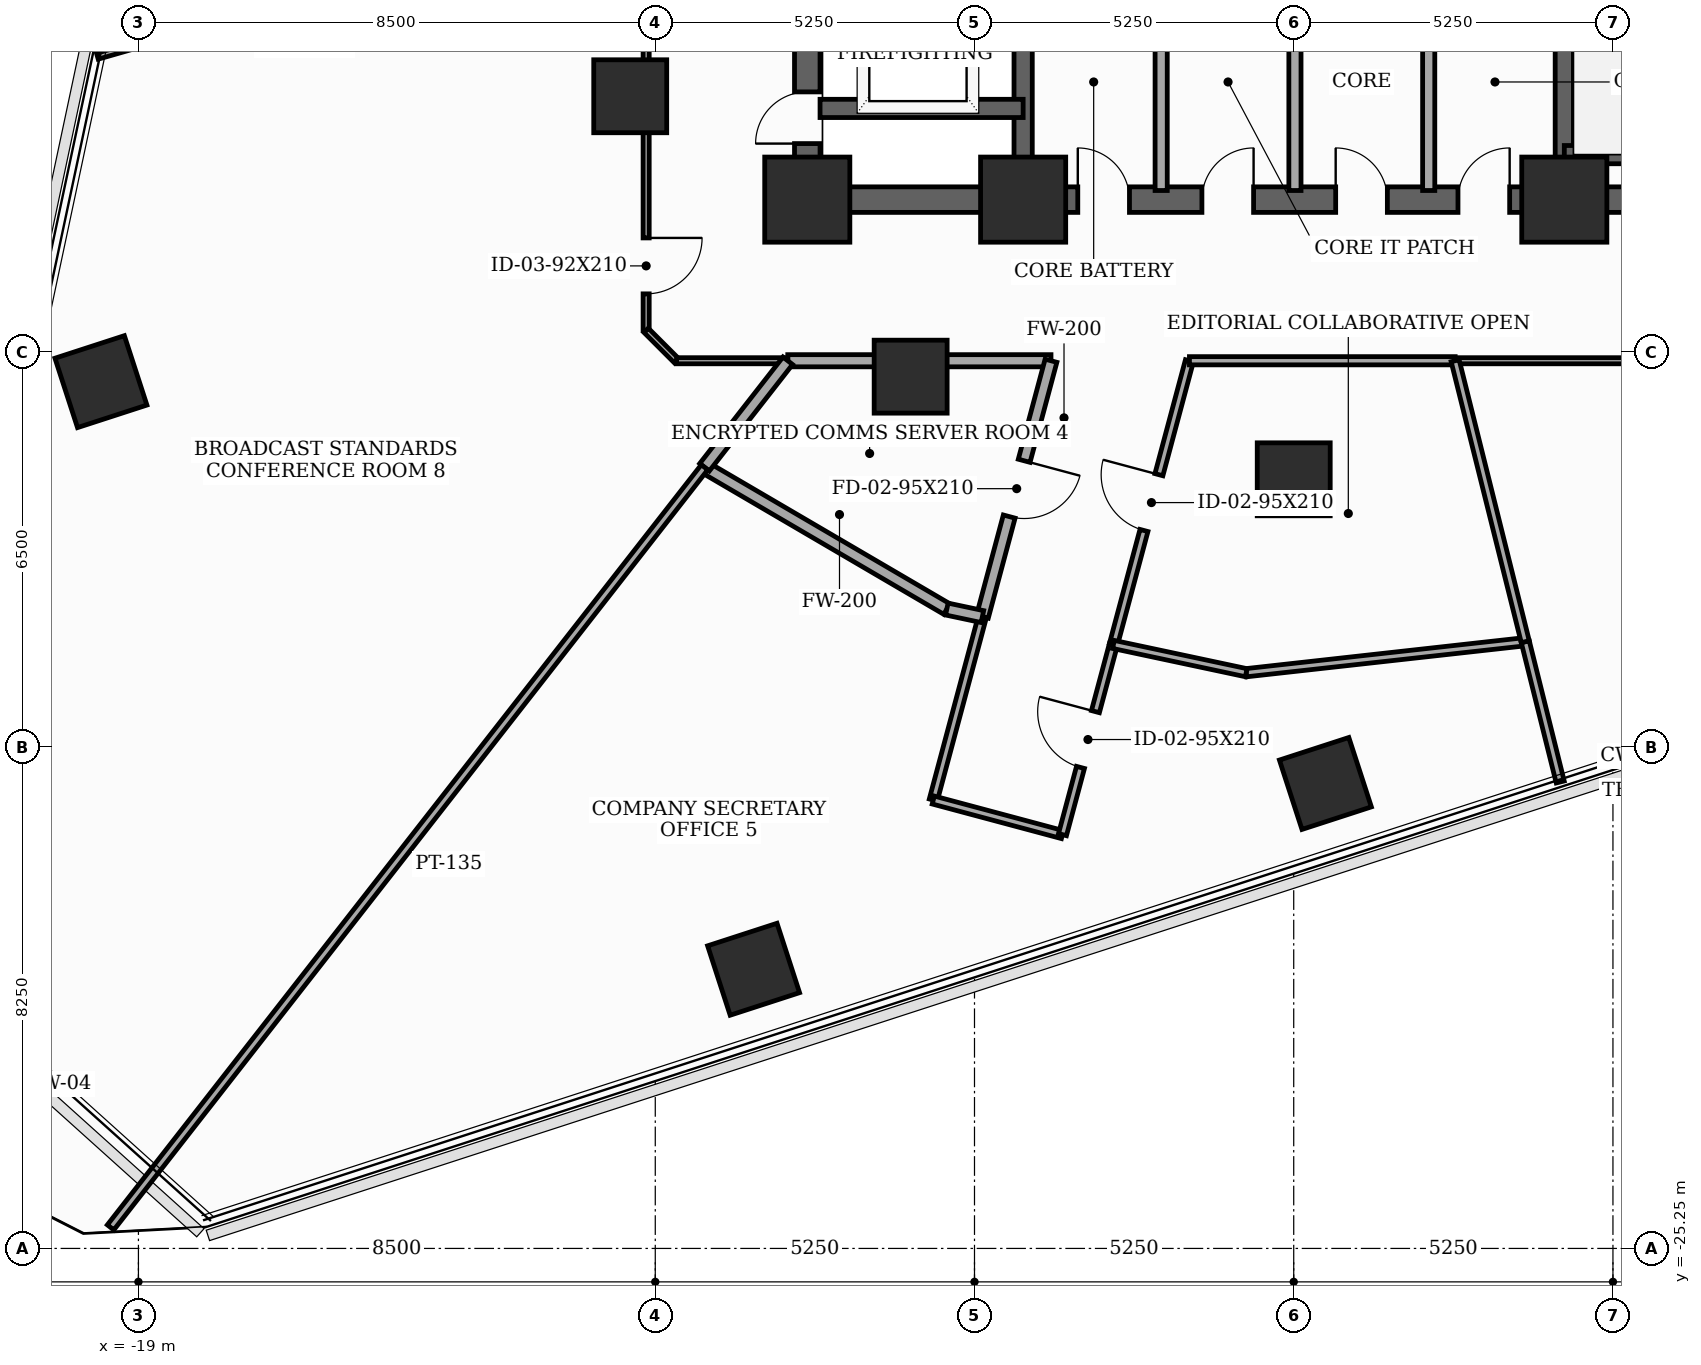
"""IFC4 building model, lengths in metres.
Left out: names, types, materials, properties, quantities, classifications, styles, units other than length and angle.
Written with IfcOpenShell. Run it as: python <this file> out.ifc"""

import sys

from ifc_helpers import new_model, si_unit, direction, frame, frame_2d, origin, origin_2d, place, context, subcontext, project, spatial, rectangle, extrude, element, fill, save


model = new_model("IFC4")
c1 = context("Model", 3, precision=1e-05, world=origin(), true_north=direction((0.0, 1.0)))
c2 = subcontext(c1, "Body", "Model", "MODEL_VIEW")
j1 = project(units=[si_unit("LENGTHUNIT", "METRE"), si_unit("PLANEANGLEUNIT", "RADIAN")], contexts=[c1])
p1 = place(None, origin())
s1 = spatial("IfcSite", under=j1, at=p1, CompositionType="ELEMENT")
p2 = place(p1, origin())
s2 = spatial("IfcBuilding", under=s1, at=p2, CompositionType="ELEMENT")
p3 = place(p2, frame((0.0, 0.0, 112.5)))
s3 = spatial("IfcBuildingStorey", under=s2, at=p3, CompositionType="ELEMENT", Elevation=112.5)
for number, where, z_axis, x_axis in (
    (1, (-8.0, -8.0, 0.0), (0.0, 0.0, 1.0), (1.0, 0.0, 0.0)),
    (2, (-4.45, -8.0, 0.0), (0.0, 0.0, 1.0), (1.0, 0.0, 0.0)),
    (3, (4.45, -8.0, 0.0), (0.0, 0.0, 1.0), (1.0, 0.0, 0.0)),
):
    element("IfcColumn", number, at=place(p3, frame(where, z_axis=z_axis, x_axis=x_axis)), inside=s3, PredefinedType="COLUMN", context=c2, shape_type="SweptSolid", body=[
        extrude(rectangle(XDim=1.4, YDim=1.4, at=origin_2d()), origin(), (0.0, 0.0, 1.0), 3.7),
    ])
for number, where, z_axis, x_axis in (
    (4, (-10.912, -6.3, 0.0), (0.0, 0.0, 1.0), (1.0, 0.0, 0.0)),
    (5, (-6.3, -10.912, 0.0), (0.0, 0.0, 1.0), (1.0, 0.0, 0.0)),
    (6, (0.0, -12.6, 0.0), (0.0, 0.0, 1.0), (1.0, 0.0, 0.0)),
    (7, (-8.883, -20.658, 0.0), (0.0, 0.0, 1.0), (0.951, 0.309, 0.0)),
    (8, (0.521, -17.603, 0.0), (0.0, 0.0, 1.0), (0.951, 0.309, 0.0)),
    (9, (-19.616, -10.994, 0.0), (0.0, 0.0, 1.0), (0.951, 0.309, 0.0)),
):
    element("IfcColumn", number, at=place(p3, frame(where, z_axis=z_axis, x_axis=x_axis)), inside=s3, PredefinedType="COLUMN", context=c2, shape_type="SweptSolid", body=[
        extrude(rectangle(XDim=1.2, YDim=1.2, at=origin_2d()), origin(), (0.0, 0.0, 1.0), 3.7),
    ])
p4 = place(p3, frame((-8.0, -8.0, 0.0), z_axis=(0.0, 0.0, 1.0), x_axis=(0.0, 1.0, 0.0)))
e10 = element("IfcWall", 10, at=p4, inside=s3, PredefinedType="SHEAR", context=c2, shape_type="SweptSolid", body=[
    extrude(rectangle(XDim=16.0, YDim=0.42, at=frame_2d((8.0, 0.0))), origin(), (0.0, 0.0, 1.0), 3.5),
])
p5 = place(p4, frame((0.922, 0.0, 0.0)))
e11 = element("IfcOpeningElement", 11, at=p5, cuts=e10, PredefinedType="OPENING", context=c2, shape_type="SweptSolid", body=[
    extrude(rectangle(XDim=0.85, YDim=2.02, at=frame_2d((0.425, 1.01))), frame((0.0, 0.22, 0.0), z_axis=(0.0, -1.0, 0.0), x_axis=(1.0, 0.0, 0.0)), (0.0, 0.0, 1.0), 0.44),
])
p6 = place(p4, frame((5.35, 0.0, 0.0)))
e12 = element("IfcOpeningElement", 12, at=p6, cuts=e10, PredefinedType="OPENING", context=c2, shape_type="SweptSolid", body=[
    extrude(rectangle(XDim=1.05, YDim=2.15, at=frame_2d((0.525, 1.075))), frame((0.0, 0.22, 0.0), z_axis=(0.0, -1.0, 0.0), x_axis=(1.0, 0.0, 0.0)), (0.0, 0.0, 1.0), 0.44),
])
p7 = place(p3, frame((-8.0, -8.0, 0.0), z_axis=(0.0, 0.0, 1.0), x_axis=(1.0, 0.0, 0.0)))
e13 = element("IfcWall", 13, at=p7, inside=s3, PredefinedType="SHEAR", context=c2, shape_type="SweptSolid", body=[
    extrude(rectangle(XDim=16.0, YDim=0.42, at=frame_2d((8.0, 0.0))), origin(), (0.0, 0.0, 1.0), 3.5),
])
p8 = place(p7, frame((4.449, 0.0, 0.0)))
e14 = element("IfcOpeningElement", 14, at=p8, cuts=e13, PredefinedType="OPENING", context=c2, shape_type="SweptSolid", body=[
    extrude(rectangle(XDim=0.85, YDim=2.02, at=frame_2d((0.425, 1.01))), frame((0.0, 0.22, 0.0), z_axis=(0.0, -1.0, 0.0), x_axis=(1.0, 0.0, 0.0)), (0.0, 0.0, 1.0), 0.44),
])
p9 = place(p7, frame((6.49, 0.0, 0.0)))
e15 = element("IfcOpeningElement", 15, at=p9, cuts=e13, PredefinedType="OPENING", context=c2, shape_type="SweptSolid", body=[
    extrude(rectangle(XDim=0.85, YDim=2.02, at=frame_2d((0.425, 1.01))), frame((0.0, 0.22, 0.0), z_axis=(0.0, -1.0, 0.0), x_axis=(1.0, 0.0, 0.0)), (0.0, 0.0, 1.0), 0.44),
])
p10 = place(p7, frame((8.69, 0.0, 0.0)))
e16 = element("IfcOpeningElement", 16, at=p10, cuts=e13, PredefinedType="OPENING", context=c2, shape_type="SweptSolid", body=[
    extrude(rectangle(XDim=0.85, YDim=2.02, at=frame_2d((0.425, 1.01))), frame((0.0, 0.22, 0.0), z_axis=(0.0, -1.0, 0.0), x_axis=(1.0, 0.0, 0.0)), (0.0, 0.0, 1.0), 0.44),
])
p11 = place(p7, frame((10.701, 0.0, 0.0)))
e17 = element("IfcOpeningElement", 17, at=p11, cuts=e13, PredefinedType="OPENING", context=c2, shape_type="SweptSolid", body=[
    extrude(rectangle(XDim=0.85, YDim=2.02, at=frame_2d((0.425, 1.01))), frame((0.0, 0.22, 0.0), z_axis=(0.0, -1.0, 0.0), x_axis=(1.0, 0.0, 0.0)), (0.0, 0.0, 1.0), 0.44),
])
for number, where, z_axis, x_axis in (
    (18, (-4.45, -7.79, 0.0), (0.0, 0.0, 1.0), (0.0, 1.0, 0.0)),
    (19, (4.45, -7.79, 0.0), (0.0, 0.0, 1.0), (0.0, 1.0, 0.0)),
):
    element("IfcWall", number, at=place(p3, frame(where, z_axis=z_axis, x_axis=x_axis)), inside=s3, PredefinedType="SHEAR", context=c2, shape_type="SweptSolid", body=[
        extrude(rectangle(XDim=15.58, YDim=0.3, at=frame_2d((7.79, 0.0))), origin(), (0.0, 0.0, 1.0), 3.5),
    ])
p12 = place(p3, frame((4.45, -7.26, 0.0), z_axis=(0.0, 0.0, 1.0), x_axis=(1.0, 0.0, 0.0)))
e20 = element("IfcWall", 20, at=p12, inside=s3, PredefinedType="SHEAR", context=c2, shape_type="SweptSolid", body=[
    extrude(rectangle(XDim=3.55, YDim=0.3, at=frame_2d((1.775, 0.0))), origin(), (0.0, 0.0, 1.0), 3.5),
])
p13 = place(p3, frame((-7.79, -6.5, 0.0), z_axis=(0.0, 0.0, 1.0), x_axis=(1.0, 0.0, 0.0)))
e21 = element("IfcWall", 21, at=p13, inside=s3, PredefinedType="SHEAR", context=c2, shape_type="SweptSolid", body=[
    extrude(rectangle(XDim=3.34, YDim=0.3, at=frame_2d((1.67, 0.0))), origin(), (0.0, 0.0, 1.0), 3.5),
])
for number, where, z_axis, x_axis in (
    (22, (-2.18, -7.85, 0.0), (0.0, 0.0, 1.0), (0.0, 1.0, 0.0)),
    (23, (0.02, -7.85, 0.0), (0.0, 0.0, 1.0), (0.0, 1.0, 0.0)),
    (24, (2.22, -7.85, 0.0), (0.0, 0.0, 1.0), (0.0, 1.0, 0.0)),
):
    element("IfcWall", number, at=place(p3, frame(where, z_axis=z_axis, x_axis=x_axis)), inside=s3, PredefinedType="SOLIDWALL", context=c2, shape_type="SweptSolid", body=[
        extrude(rectangle(XDim=2.95, YDim=0.2, at=frame_2d((1.475, 0.0))), origin(), (0.0, 0.0, 1.0), 2.885),
    ])
p14 = place(p3, frame((-8.321, -10.65, 0.0), z_axis=(0.0, 0.0, 1.0), x_axis=(1.0, 0.0, 0.0)))
e25 = element("IfcWall", 25, at=p14, inside=s3, PredefinedType="SOLIDWALL", context=c2, shape_type="SweptSolid", body=[
    extrude(rectangle(XDim=4.329, YDim=0.2, at=frame_2d((2.165, 0.0))), origin(), (0.0, 0.0, 1.0), 2.785),
])
p15 = place(p3, frame((-3.992, -10.65, 0.0), z_axis=(0.0, 0.0, 1.0), x_axis=(-0.258956433159, -0.965889002798, 0.0)))
e26 = element("IfcWall", 26, at=p15, inside=s3, PredefinedType="SOLIDWALL", context=c2, shape_type="SweptSolid", body=[
    extrude(rectangle(XDim=4.357, YDim=0.2, at=frame_2d((2.178, 0.0))), origin(), (0.0, 0.0, 1.0), 2.785),
])
p16 = place(p15, frame((1.703, 0.0, 0.0)))
e27 = element("IfcOpeningElement", 27, at=p16, cuts=e26, PredefinedType="OPENING", context=c2, shape_type="SweptSolid", body=[
    extrude(rectangle(XDim=0.95, YDim=2.1, at=frame_2d((0.475, 1.05))), frame((0.0, 0.11, 0.0), z_axis=(0.0, -1.0, 0.0), x_axis=(1.0, 0.0, 0.0)), (0.0, 0.0, 1.0), 0.22),
])
p17 = place(p3, frame((-5.12, -14.858, 0.0), z_axis=(0.0, 0.0, 1.0), x_axis=(-0.25865012757, -0.965971071776, 0.0)))
e28 = element("IfcWall", 28, at=p17, inside=s3, PredefinedType="PARTITIONING", context=c2, shape_type="SweptSolid", body=[
    extrude(rectangle(XDim=3.123, YDim=0.135, at=frame_2d((1.562, 0.0))), origin(), (0.0, 0.0, 1.0), 3.125),
])
p18 = place(p3, frame((-5.928, -17.875, 0.0), z_axis=(0.0, 0.0, 1.0), x_axis=(0.965959937537, -0.258691706618, 0.0)))
e29 = element("IfcWall", 29, at=p18, inside=s3, PredefinedType="PARTITIONING", context=c2, shape_type="SweptSolid", body=[
    extrude(rectangle(XDim=2.2, YDim=0.135, at=frame_2d((1.1, 0.0))), origin(), (0.0, 0.0, 1.0), 3.5),
])
p19 = place(p3, frame((-3.803, -18.444, 0.0), z_axis=(0.0, 0.0, 1.0), x_axis=(0.258732316933, 0.965949060859, 0.0)))
e30 = element("IfcWall", 30, at=p19, inside=s3, PredefinedType="PARTITIONING", context=c2, shape_type="SweptSolid", body=[
    extrude(rectangle(XDim=3.239, YDim=0.135, at=frame_2d((1.619, 0.0))), origin(), (0.0, 0.0, 1.0), 3.125),
])
p20 = place(p19, frame((1.144, 0.0, 0.0)))
e31 = element("IfcOpeningElement", 31, at=p20, cuts=e30, PredefinedType="OPENING", context=c2, shape_type="SweptSolid", body=[
    extrude(rectangle(XDim=0.95, YDim=2.1, at=frame_2d((0.475, 1.05))), frame((0.0, 0.077, 0.0), z_axis=(0.0, -1.0, 0.0), x_axis=(1.0, 0.0, 0.0)), (0.0, 0.0, 1.0), 0.155),
])
p21 = place(p3, frame((-2.965, -15.316, 0.0), z_axis=(0.0, 0.0, 1.0), x_axis=(0.258769769022, 0.965939028428, 0.0)))
e32 = element("IfcWall", 32, at=p21, inside=s3, PredefinedType="PARTITIONING", context=c2, shape_type="SweptSolid", body=[
    extrude(rectangle(XDim=4.831, YDim=0.135, at=frame_2d((2.415, 0.0))), origin(), (0.0, 0.0, 1.0), 2.785),
])
p22 = place(p21, frame((1.94, 0.0, 0.0)))
e33 = element("IfcOpeningElement", 33, at=p22, cuts=e32, PredefinedType="OPENING", context=c2, shape_type="SweptSolid", body=[
    extrude(rectangle(XDim=0.95, YDim=2.1, at=frame_2d((0.475, 1.05))), frame((0.0, 0.077, 0.0), z_axis=(0.0, -1.0, 0.0), x_axis=(1.0, 0.0, 0.0)), (0.0, 0.0, 1.0), 0.155),
])
p23 = place(p3, frame((-1.715, -10.65, 0.0), z_axis=(0.0, 0.0, 1.0), x_axis=(1.0, 0.0, 0.0)))
e34 = element("IfcWall", 34, at=p23, inside=s3, PredefinedType="PARTITIONING", context=c2, shape_type="SweptSolid", body=[
    extrude(rectangle(XDim=4.37, YDim=0.135, at=frame_2d((2.185, 0.0))), origin(), (0.0, 0.0, 1.0), 2.785),
])
p24 = place(p3, frame((-10.65, -4.85, 0.0), z_axis=(0.0, 0.0, 1.0), x_axis=(0.0, -1.0, 0.0)))
e35 = element("IfcWall", 35, at=p24, inside=s3, PredefinedType="MOVABLE", context=c2, shape_type="SweptSolid", body=[
    extrude(rectangle(XDim=5.3, YDim=0.1, at=frame_2d((2.65, 0.0))), origin(), (0.0, 0.0, 1.0), 2.785),
])
p25 = place(p24, frame((3.78, 0.0, 0.0)))
e36 = element("IfcOpeningElement", 36, at=p25, cuts=e35, PredefinedType="OPENING", context=c2, shape_type="SweptSolid", body=[
    extrude(rectangle(XDim=0.92, YDim=2.1, at=frame_2d((0.46, 1.05))), frame((0.0, 0.06, 0.0), z_axis=(0.0, -1.0, 0.0), x_axis=(1.0, 0.0, 0.0)), (0.0, 0.0, 1.0), 0.12),
])
p26 = place(p3, frame((-10.65, -10.15, 0.0), z_axis=(0.0, 0.0, 1.0), x_axis=(0.707106781187, -0.707106781187, 0.0)))
e37 = element("IfcWall", 37, at=p26, inside=s3, PredefinedType="MOVABLE", context=c2, shape_type="SweptSolid", body=[
    extrude(rectangle(XDim=0.707, YDim=0.1, at=frame_2d((0.354, 0.0))), origin(), (0.0, 0.0, 1.0), 3.5),
])
p27 = place(p3, frame((-10.15, -10.65, 0.0), z_axis=(0.0, 0.0, 1.0), x_axis=(1.0, 0.0, 0.0)))
e38 = element("IfcWall", 38, at=p27, inside=s3, PredefinedType="MOVABLE", context=c2, shape_type="SweptSolid", body=[
    extrude(rectangle(XDim=1.829, YDim=0.1, at=frame_2d((0.915, 0.0))), origin(), (0.0, 0.0, 1.0), 3.5),
])
p28 = place(p3, frame((2.655, -10.65, 0.0), z_axis=(0.0, 0.0, 1.0), x_axis=(1.0, 0.0, 0.0)))
e39 = element("IfcWall", 39, at=p28, inside=s3, PredefinedType="MOVABLE", context=c2, shape_type="SweptSolid", body=[
    extrude(rectangle(XDim=7.495, YDim=0.1, at=frame_2d((3.748, 0.0))), origin(), (0.0, 0.0, 1.0), 2.785),
])
p29 = place(p3, frame((-9.69, -12.402, 0.0), z_axis=(0.0, 0.0, 1.0), x_axis=(0.863091493537, -0.505047595563, 0.0)))
e40 = element("IfcWall", 40, at=p29, inside=s3, PredefinedType="SOLIDWALL", context=c2, shape_type="SweptSolid", body=[
    extrude(rectangle(XDim=4.617, YDim=0.2, at=frame_2d((2.309, 0.0))), origin(), (0.0, 0.0, 1.0), 2.785),
])
p30 = place(p3, frame((-5.705, -14.734, 0.0), z_axis=(0.0, 0.0, 1.0), x_axis=(0.978254211939, -0.207409490678, 0.0)))
e41 = element("IfcWall", 41, at=p30, inside=s3, PredefinedType="SOLIDWALL", context=c2, shape_type="SweptSolid", body=[
    extrude(rectangle(XDim=0.598, YDim=0.2, at=frame_2d((0.299, 0.0))), origin(), (0.0, 0.0, 1.0), 3.5),
])
p31 = place(p3, frame((-8.321, -10.65, 0.0), z_axis=(0.0, 0.0, 1.0), x_axis=(-0.615641911247, -0.788026038349, 0.0)))
e42 = element("IfcWall", 42, at=p31, inside=s3, PredefinedType="SOLIDWALL", context=c2, shape_type="SweptSolid", body=[
    extrude(rectangle(XDim=2.224, YDim=0.2, at=frame_2d((1.112, 0.0))), origin(), (0.0, 0.0, 1.0), 3.5),
])
p32 = place(p3, frame((3.808, -15.271, 0.0), z_axis=(0.0, 0.0, 1.0), x_axis=(-0.993881155161, -0.110454739221, 0.0)))
e43 = element("IfcWall", 43, at=p32, inside=s3, PredefinedType="PARTITIONING", context=c2, shape_type="SweptSolid", body=[
    extrude(rectangle(XDim=4.617, YDim=0.135, at=frame_2d((2.309, 0.0))), origin(), (0.0, 0.0, 1.0), 2.785),
])
p33 = place(p3, frame((-0.781, -15.781, 0.0), z_axis=(0.0, 0.0, 1.0), x_axis=(-0.978070402464, 0.20827454915, 0.0)))
e44 = element("IfcWall", 44, at=p33, inside=s3, PredefinedType="PARTITIONING", context=c2, shape_type="SweptSolid", body=[
    extrude(rectangle(XDim=2.233, YDim=0.135, at=frame_2d((1.117, 0.0))), origin(), (0.0, 0.0, 1.0), 3.125),
])
p34 = place(p3, frame((-9.69, -12.402, 0.0), z_axis=(0.0, 0.0, 1.0), x_axis=(-0.615679875475, -0.787996377489, 0.0)))
e45 = element("IfcWall", 45, at=p34, inside=s3, PredefinedType="PARTITIONING", context=c2, shape_type="SweptSolid", body=[
    extrude(rectangle(XDim=15.865, YDim=0.135, at=frame_2d((7.933, 0.0))), origin(), (0.0, 0.0, 1.0), 2.935),
])
p35 = place(p3, frame((4.383, -17.578, 0.0), z_axis=(0.0, 0.0, 1.0), x_axis=(-0.241714079876, 0.970347516918, 0.0)))
e46 = element("IfcWall", 46, at=p35, inside=s3, PredefinedType="PARTITIONING", context=c2, shape_type="SweptSolid", body=[
    extrude(rectangle(XDim=2.378, YDim=0.135, at=frame_2d((1.189, 0.0))), origin(), (0.0, 0.0, 1.0), 2.935),
])
p36 = place(p3, frame((3.808, -15.271, 0.0), z_axis=(0.0, 0.0, 1.0), x_axis=(-0.242101397643, 0.970250953753, 0.0)))
e47 = element("IfcWall", 47, at=p36, inside=s3, PredefinedType="PARTITIONING", context=c2, shape_type="SweptSolid", body=[
    extrude(rectangle(XDim=4.763, YDim=0.135, at=frame_2d((2.381, 0.0))), origin(), (0.0, 0.0, 1.0), 2.785),
])
p37 = place(p3, frame((-13.1, -3.756, 0.0), z_axis=(0.0, 0.0, 1.0), x_axis=(-0.961255453737, -0.275659124029, 0.0)))
e48 = element("IfcWall", 48, at=p37, inside=s3, PredefinedType="MOVABLE", context=c2, shape_type="SweptSolid", body=[
    extrude(rectangle(XDim=6.84, YDim=0.1, at=frame_2d((3.42, 0.0))), origin(), (0.0, 0.0, 1.0), 2.935),
])
p38 = place(p5, origin())
e49 = element("IfcDoor", 49, at=p38, inside=s3, OperationType="SINGLE_SWING_LEFT", PredefinedType="TRAPDOOR", context=c2, shape_type="SweptSolid", body=[
    extrude(rectangle(XDim=0.85, YDim=2.02, at=frame_2d((0.425, 1.01))), frame((0.0, 0.025, 0.0), z_axis=(0.0, -1.0, 0.0), x_axis=(1.0, 0.0, 0.0)), (0.0, 0.0, 1.0), 0.05),
])
fill(e11, e49)
p39 = place(p8, origin())
e50 = element("IfcDoor", 50, at=p39, inside=s3, OperationType="SINGLE_SWING_LEFT", PredefinedType="TRAPDOOR", context=c2, shape_type="SweptSolid", body=[
    extrude(rectangle(XDim=0.85, YDim=2.02, at=frame_2d((0.425, 1.01))), frame((0.0, 0.025, 0.0), z_axis=(0.0, -1.0, 0.0), x_axis=(1.0, 0.0, 0.0)), (0.0, 0.0, 1.0), 0.05),
])
fill(e14, e50)
p40 = place(p9, origin())
e51 = element("IfcDoor", 51, at=p40, inside=s3, OperationType="SINGLE_SWING_RIGHT", PredefinedType="TRAPDOOR", context=c2, shape_type="SweptSolid", body=[
    extrude(rectangle(XDim=0.85, YDim=2.02, at=frame_2d((0.425, 1.01))), frame((0.0, 0.025, 0.0), z_axis=(0.0, -1.0, 0.0), x_axis=(1.0, 0.0, 0.0)), (0.0, 0.0, 1.0), 0.05),
])
fill(e15, e51)
p41 = place(p10, origin())
e52 = element("IfcDoor", 52, at=p41, inside=s3, OperationType="SINGLE_SWING_LEFT", PredefinedType="TRAPDOOR", context=c2, shape_type="SweptSolid", body=[
    extrude(rectangle(XDim=0.85, YDim=2.02, at=frame_2d((0.425, 1.01))), frame((0.0, 0.025, 0.0), z_axis=(0.0, -1.0, 0.0), x_axis=(1.0, 0.0, 0.0)), (0.0, 0.0, 1.0), 0.05),
])
fill(e16, e52)
p42 = place(p11, origin())
e53 = element("IfcDoor", 53, at=p42, inside=s3, OperationType="SINGLE_SWING_RIGHT", PredefinedType="TRAPDOOR", context=c2, shape_type="SweptSolid", body=[
    extrude(rectangle(XDim=0.85, YDim=2.02, at=frame_2d((0.425, 1.01))), frame((0.0, 0.025, 0.0), z_axis=(0.0, -1.0, 0.0), x_axis=(1.0, 0.0, 0.0)), (0.0, 0.0, 1.0), 0.05),
])
fill(e17, e53)
p43 = place(p16, origin())
e54 = element("IfcDoor", 54, at=p43, inside=s3, OperationType="SINGLE_SWING_LEFT", PredefinedType="DOOR", context=c2, shape_type="SweptSolid", body=[
    extrude(rectangle(XDim=0.95, YDim=2.1, at=frame_2d((0.475, 1.05))), frame((0.0, 0.025, 0.0), z_axis=(0.0, -1.0, 0.0), x_axis=(1.0, 0.0, 0.0)), (0.0, 0.0, 1.0), 0.05),
])
fill(e27, e54)
p44 = place(p20, origin())
e55 = element("IfcDoor", 55, at=p44, inside=s3, OperationType="SINGLE_SWING_RIGHT", PredefinedType="DOOR", context=c2, shape_type="SweptSolid", body=[
    extrude(rectangle(XDim=0.95, YDim=2.1, at=frame_2d((0.475, 1.05))), frame((0.0, 0.025, 0.0), z_axis=(0.0, -1.0, 0.0), x_axis=(1.0, 0.0, 0.0)), (0.0, 0.0, 1.0), 0.05),
])
fill(e31, e55)
p45 = place(p22, origin())
e56 = element("IfcDoor", 56, at=p45, inside=s3, OperationType="SINGLE_SWING_RIGHT", PredefinedType="DOOR", context=c2, shape_type="SweptSolid", body=[
    extrude(rectangle(XDim=0.95, YDim=2.1, at=frame_2d((0.475, 1.05))), frame((0.0, 0.025, 0.0), z_axis=(0.0, -1.0, 0.0), x_axis=(1.0, 0.0, 0.0)), (0.0, 0.0, 1.0), 0.05),
])
fill(e33, e56)
p46 = place(p25, origin())
e57 = element("IfcDoor", 57, at=p46, inside=s3, OperationType="SINGLE_SWING_LEFT", PredefinedType="DOOR", context=c2, shape_type="SweptSolid", body=[
    extrude(rectangle(XDim=0.92, YDim=2.1, at=frame_2d((0.46, 1.05))), frame((0.0, 0.025, 0.0), z_axis=(0.0, -1.0, 0.0), x_axis=(1.0, 0.0, 0.0)), (0.0, 0.0, 1.0), 0.05),
])
fill(e36, e57)
save(model, sys.argv[1])
